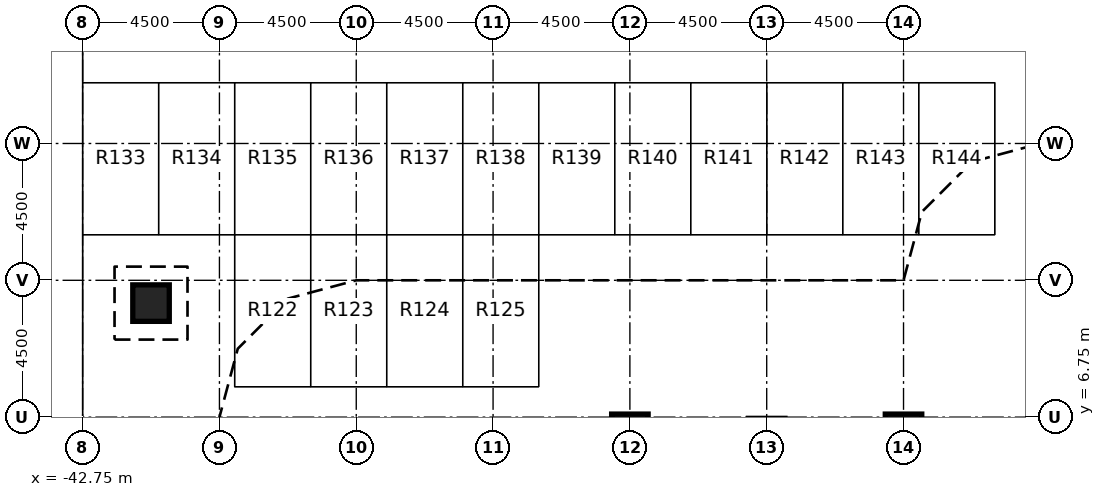
"""IFC4 building model, lengths in metres.
Left out: names, types, materials, properties, quantities, classifications, styles, units other than length and angle.
Written with IfcOpenShell. Run it as: python <this file> out.ifc"""

import sys

from ifc_helpers import new_model, si_unit, direction, frame, origin, origin_2d, place, context, subcontext, project, spatial, rectangle, extrude, element, save


model = new_model("IFC4")
c1 = context("Model", 3, precision=1e-05, world=origin(), true_north=direction((0.0, 1.0)))
c2 = subcontext(c1, "Body", "Model", "MODEL_VIEW")
j1 = project(units=[si_unit("LENGTHUNIT", "METRE"), si_unit("PLANEANGLEUNIT", "RADIAN")], contexts=[c1])
p1 = place(None, origin())
s1 = spatial("IfcSite", under=j1, at=p1, CompositionType="ELEMENT")
p2 = place(p1, origin())
s2 = spatial("IfcBuilding", under=s1, at=p2, CompositionType="ELEMENT")
p3 = place(p2, frame((0.0, 0.0, -8.0)))
s3 = spatial("IfcBuildingStorey", under=s2, at=p3, CompositionType="ELEMENT", Elevation=-8.0)
for number, where, z_axis, x_axis in (
    (1, (-40.5, 10.5, 0.0), (0.0, 0.0, 1.0), (1.0, 0.0, 0.0)),
    (2, (-24.75, 6.25, 0.0), (0.0, 0.0, 1.0), (1.0, 0.0, 0.0)),
    (3, (-15.75, 6.25, 0.0), (0.0, 0.0, 1.0), (1.0, 0.0, 0.0)),
):
    element("IfcColumn", number, at=place(p3, frame(where, z_axis=z_axis, x_axis=x_axis)), inside=s3, PredefinedType="COLUMN", context=c2, shape_type="SweptSolid", body=[
        extrude(rectangle(XDim=1.2, YDim=1.2, at=origin_2d()), origin(), (0.0, 0.0, 1.0), 3.4),
    ])
save(model, sys.argv[1])
